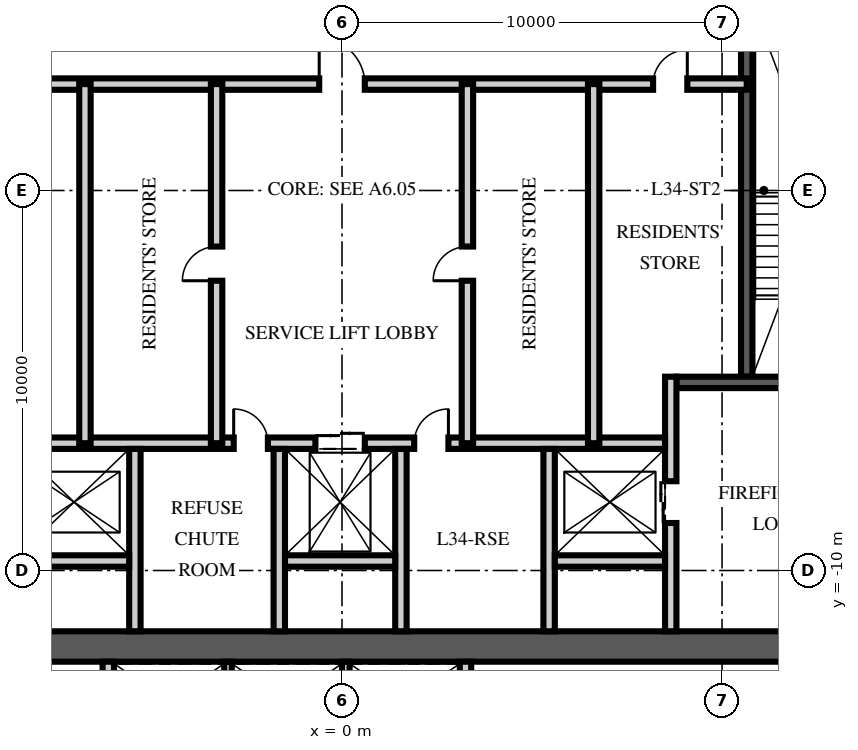
"""IFC4 building model, lengths in metres.
Left out: names, types, materials, properties, quantities, classifications, styles, units other than length and angle.
Written with IfcOpenShell. Run it as: python <this file> out.ifc"""

import sys

from ifc_helpers import new_model, si_unit, direction, frame, frame_2d, origin, place, context, subcontext, project, spatial, rectangle, extrude, element, fill, save


model = new_model("IFC4")
c1 = context("Model", 3, precision=1e-05, world=origin(), true_north=direction((0.0, 1.0)))
c2 = subcontext(c1, "Body", "Model", "MODEL_VIEW")
j1 = project(units=[si_unit("LENGTHUNIT", "METRE"), si_unit("PLANEANGLEUNIT", "RADIAN")], contexts=[c1])
p1 = place(None, origin())
s1 = spatial("IfcSite", under=j1, at=p1, CompositionType="ELEMENT")
p2 = place(p1, origin())
s2 = spatial("IfcBuilding", under=s1, at=p2, CompositionType="ELEMENT")
p3 = place(p2, frame((0.0, 0.0, 137.25)))
s3 = spatial("IfcBuildingStorey", under=s2, at=p3, CompositionType="ELEMENT", Elevation=137.25)
p4 = place(p3, frame((-15.5, -12.0, -0.25), z_axis=(0.0, 0.0, 1.0), x_axis=(1.0, 0.0, 0.0)))
e1 = element("IfcWall", 1, at=p4, inside=s3, PredefinedType="SHEAR", context=c2, shape_type="SweptSolid", body=[
    extrude(rectangle(XDim=31.0, YDim=0.8, at=frame_2d((15.5, 0.0))), origin(), (0.0, 0.0, 1.0), 3.75),
])
p5 = place(p3, frame((10.65, -4.9, 0.0), z_axis=(0.0, 0.0, 1.0), x_axis=(0.0, 1.0, 0.0)))
e2 = element("IfcWall", 2, at=p5, inside=s3, PredefinedType="SOLIDWALL", context=c2, shape_type="SweptSolid", body=[
    extrude(rectangle(XDim=10.1, YDim=0.3, at=frame_2d((5.05, 0.0))), origin(), (0.0, 0.0, 1.0), 3.5),
])
p6 = place(p3, frame((14.5, -5.05, 0.0), z_axis=(0.0, 0.0, 1.0), x_axis=(-1.0, 0.0, 0.0)))
e3 = element("IfcWall", 3, at=p6, inside=s3, PredefinedType="SOLIDWALL", context=c2, shape_type="SweptSolid", body=[
    extrude(rectangle(XDim=5.7, YDim=0.3, at=frame_2d((2.85, 0.0))), origin(), (0.0, 0.0, 1.0), 3.5),
])
p7 = place(p6, frame((1.25, 0.0, 0.0)))
e4 = element("IfcOpeningElement", 4, at=p7, cuts=e3, PredefinedType="OPENING", context=c2, shape_type="SweptSolid", body=[
    extrude(rectangle(XDim=1.2, YDim=2.1, at=frame_2d((0.6, 1.05))), frame((0.0, 0.16, 0.0), z_axis=(0.0, -1.0, 0.0), x_axis=(1.0, 0.0, 0.0)), (0.0, 0.0, 1.0), 0.32),
])
p8 = place(p3, frame((8.65, -11.6, 0.0), z_axis=(0.0, 0.0, 1.0), x_axis=(0.0, 1.0, 0.0)))
e5 = element("IfcWall", 5, at=p8, inside=s3, PredefinedType="PARTITIONING", context=c2, shape_type="SweptSolid", body=[
    extrude(rectangle(XDim=6.7, YDim=0.3, at=frame_2d((3.35, 0.0))), origin(), (0.0, 0.0, 1.0), 3.5),
])
p9 = place(p8, frame((2.85, 0.0, 0.0)))
e6 = element("IfcOpeningElement", 6, at=p9, cuts=e5, PredefinedType="OPENING", context=c2, shape_type="SweptSolid", body=[
    extrude(rectangle(XDim=1.1, YDim=2.1, at=frame_2d((0.55, 1.05))), frame((0.0, 0.16, 0.0), z_axis=(0.0, -1.0, 0.0), x_axis=(1.0, 0.0, 0.0)), (0.0, 0.0, 1.0), 0.32),
])
p10 = place(p3, frame((-8.5, -6.65, 0.0), z_axis=(0.0, 0.0, 1.0), x_axis=(1.0, 0.0, 0.0)))
e7 = element("IfcWall", 7, at=p10, inside=s3, PredefinedType="PARTITIONING", context=c2, shape_type="SweptSolid", body=[
    extrude(rectangle(XDim=17.0, YDim=0.3, at=frame_2d((8.5, 0.0))), origin(), (0.0, 0.0, 1.0), 3.5),
])
p11 = place(p10, frame((7.8, 0.0, 0.0)))
e8 = element("IfcOpeningElement", 8, at=p11, cuts=e7, PredefinedType="OPENING", context=c2, shape_type="SweptSolid", body=[
    extrude(rectangle(XDim=1.3, YDim=2.4, at=frame_2d((0.65, 1.2))), frame((0.0, 0.16, 0.0), z_axis=(0.0, -1.0, 0.0), x_axis=(1.0, 0.0, 0.0)), (0.0, 0.0, 1.0), 0.32),
])
p12 = place(p10, frame((5.65, 0.0, 0.0)))
e9 = element("IfcOpeningElement", 9, at=p12, cuts=e7, PredefinedType="OPENING", context=c2, shape_type="SweptSolid", body=[
    extrude(rectangle(XDim=0.9, YDim=2.1, at=frame_2d((0.45, 1.05))), frame((0.0, 0.16, 0.0), z_axis=(0.0, -1.0, 0.0), x_axis=(1.0, 0.0, 0.0)), (0.0, 0.0, 1.0), 0.32),
])
p13 = place(p10, frame((10.4, 0.0, 0.0)))
e10 = element("IfcOpeningElement", 10, at=p13, cuts=e7, PredefinedType="OPENING", context=c2, shape_type="SweptSolid", body=[
    extrude(rectangle(XDim=0.9, YDim=2.1, at=frame_2d((0.45, 1.05))), frame((0.0, 0.16, 0.0), z_axis=(0.0, -1.0, 0.0), x_axis=(1.0, 0.0, 0.0)), (0.0, 0.0, 1.0), 0.32),
])
for number, where, z_axis, x_axis in (
    (11, (-5.45, -11.6, 0.0), (0.0, 0.0, 1.0), (0.0, 1.0, 0.0)),
    (12, (-1.65, -11.6, 0.0), (0.0, 0.0, 1.0), (0.0, 1.0, 0.0)),
    (13, (1.55, -11.6, 0.0), (0.0, 0.0, 1.0), (0.0, 1.0, 0.0)),
    (14, (5.45, -11.6, 0.0), (0.0, 0.0, 1.0), (0.0, 1.0, 0.0)),
):
    element("IfcWall", number, at=place(p3, frame(where, z_axis=z_axis, x_axis=x_axis)), inside=s3, PredefinedType="PARTITIONING", context=c2, shape_type="SweptSolid", body=[
        extrude(rectangle(XDim=4.8, YDim=0.3, at=frame_2d((2.4, 0.0))), origin(), (0.0, 0.0, 1.0), 3.5),
    ])
for number, where, z_axis, x_axis in (
    (15, (-8.5, -9.75, 0.0), (0.0, 0.0, 1.0), (1.0, 0.0, 0.0)),
    (16, (-1.5, -9.75, 0.0), (0.0, 0.0, 1.0), (1.0, 0.0, 0.0)),
    (17, (5.6, -9.75, 0.0), (0.0, 0.0, 1.0), (1.0, 0.0, 0.0)),
):
    element("IfcWall", number, at=place(p3, frame(where, z_axis=z_axis, x_axis=x_axis)), inside=s3, PredefinedType="PARTITIONING", context=c2, shape_type="SweptSolid", body=[
        extrude(rectangle(XDim=2.9, YDim=0.3, at=frame_2d((1.45, 0.0))), origin(), (0.0, 0.0, 1.0), 3.5),
    ])
for number, where, z_axis, x_axis in (
    (18, (-6.15, -14.5, 0.0), (0.0, 0.0, 1.0), (0.0, 1.0, 0.0)),
    (19, (3.25, -14.5, 0.0), (0.0, 0.0, 1.0), (0.0, 1.0, 0.0)),
):
    element("IfcWall", number, at=place(p3, frame(where, z_axis=z_axis, x_axis=x_axis)), inside=s3, PredefinedType="PARTITIONING", context=c2, shape_type="SweptSolid", body=[
        extrude(rectangle(XDim=2.1, YDim=0.3, at=frame_2d((1.05, 0.0))), origin(), (0.0, 0.0, 1.0), 3.5),
    ])
for number, where, z_axis, x_axis in (
    (20, (-3.0, -14.5, 0.0), (0.0, 0.0, 1.0), (0.0, 1.0, 0.0)),
    (21, (0.1, -14.5, 0.0), (0.0, 0.0, 1.0), (0.0, 1.0, 0.0)),
):
    element("IfcWall", number, at=place(p3, frame(where, z_axis=z_axis, x_axis=x_axis)), inside=s3, PredefinedType="PARTITIONING", context=c2, shape_type="SweptSolid", body=[
        extrude(rectangle(XDim=2.1, YDim=0.2, at=frame_2d((1.05, 0.0))), origin(), (0.0, 0.0, 1.0), 3.5),
    ])
p14 = place(p3, frame((-10.65, 2.8, 0.0), z_axis=(0.0, 0.0, 1.0), x_axis=(1.0, 0.0, 0.0)))
e22 = element("IfcWall", 22, at=p14, inside=s3, PredefinedType="PARTITIONING", context=c2, shape_type="SweptSolid", body=[
    extrude(rectangle(XDim=21.3, YDim=0.3, at=frame_2d((10.65, 0.0))), origin(), (0.0, 0.0, 1.0), 3.5),
])
p15 = place(p14, frame((10.05, 0.0, 0.0)))
e23 = element("IfcOpeningElement", 23, at=p15, cuts=e22, PredefinedType="OPENING", context=c2, shape_type="SweptSolid", body=[
    extrude(rectangle(XDim=1.2, YDim=2.1, at=frame_2d((0.6, 1.05))), frame((0.0, 0.16, 0.0), z_axis=(0.0, -1.0, 0.0), x_axis=(1.0, 0.0, 0.0)), (0.0, 0.0, 1.0), 0.32),
])
p16 = place(p14, frame((1.493, 0.0, 0.0)))
e24 = element("IfcOpeningElement", 24, at=p16, cuts=e22, PredefinedType="OPENING", context=c2, shape_type="SweptSolid", body=[
    extrude(rectangle(XDim=0.9, YDim=2.1, at=frame_2d((0.45, 1.05))), frame((0.0, 0.16, 0.0), z_axis=(0.0, -1.0, 0.0), x_axis=(1.0, 0.0, 0.0)), (0.0, 0.0, 1.0), 0.32),
])
p17 = place(p14, frame((18.836, 0.0, 0.0)))
e25 = element("IfcOpeningElement", 25, at=p17, cuts=e22, PredefinedType="OPENING", context=c2, shape_type="SweptSolid", body=[
    extrude(rectangle(XDim=0.9, YDim=2.1, at=frame_2d((0.45, 1.05))), frame((0.0, 0.16, 0.0), z_axis=(0.0, -1.0, 0.0), x_axis=(1.0, 0.0, 0.0)), (0.0, 0.0, 1.0), 0.32),
])
p18 = place(p3, frame((-3.3, -6.65, 0.0), z_axis=(0.0, 0.0, 1.0), x_axis=(0.0, 1.0, 0.0)))
e26 = element("IfcWall", 26, at=p18, inside=s3, PredefinedType="PARTITIONING", context=c2, shape_type="SweptSolid", body=[
    extrude(rectangle(XDim=9.45, YDim=0.3, at=frame_2d((4.725, 0.0))), origin(), (0.0, 0.0, 1.0), 3.5),
])
p19 = place(p18, frame((4.275, 0.0, 0.0)))
e27 = element("IfcOpeningElement", 27, at=p19, cuts=e26, PredefinedType="OPENING", context=c2, shape_type="SweptSolid", body=[
    extrude(rectangle(XDim=0.9, YDim=2.1, at=frame_2d((0.45, 1.05))), frame((0.0, 0.16, 0.0), z_axis=(0.0, -1.0, 0.0), x_axis=(1.0, 0.0, 0.0)), (0.0, 0.0, 1.0), 0.32),
])
p20 = place(p3, frame((3.3, -6.65, 0.0), z_axis=(0.0, 0.0, 1.0), x_axis=(0.0, 1.0, 0.0)))
e28 = element("IfcWall", 28, at=p20, inside=s3, PredefinedType="PARTITIONING", context=c2, shape_type="SweptSolid", body=[
    extrude(rectangle(XDim=9.45, YDim=0.3, at=frame_2d((4.725, 0.0))), origin(), (0.0, 0.0, 1.0), 3.5),
])
p21 = place(p20, frame((4.275, 0.0, 0.0)))
e29 = element("IfcOpeningElement", 29, at=p21, cuts=e28, PredefinedType="OPENING", context=c2, shape_type="SweptSolid", body=[
    extrude(rectangle(XDim=0.9, YDim=2.1, at=frame_2d((0.45, 1.05))), frame((0.0, 0.16, 0.0), z_axis=(0.0, -1.0, 0.0), x_axis=(1.0, 0.0, 0.0)), (0.0, 0.0, 1.0), 0.32),
])
for number, where, z_axis, x_axis in (
    (30, (-6.764, -6.65, 0.0), (0.0, 0.0, 1.0), (0.0, 1.0, 0.0)),
    (31, (6.622, -6.65, 0.0), (0.0, 0.0, 1.0), (0.0, 1.0, 0.0)),
):
    element("IfcWall", number, at=place(p3, frame(where, z_axis=z_axis, x_axis=x_axis)), inside=s3, PredefinedType="PARTITIONING", context=c2, shape_type="SweptSolid", body=[
        extrude(rectangle(XDim=9.45, YDim=0.3, at=frame_2d((4.725, 0.0))), origin(), (0.0, 0.0, 1.0), 3.5),
    ])
p22 = place(p9, origin())
e32 = element("IfcDoor", 32, at=p22, inside=s3, OperationType="DOUBLE_DOOR_SLIDING", PredefinedType="DOOR", context=c2, shape_type="SweptSolid", body=[
    extrude(rectangle(XDim=1.1, YDim=2.1, at=frame_2d((0.55, 1.05))), frame((0.0, 0.025, 0.0), z_axis=(0.0, -1.0, 0.0), x_axis=(1.0, 0.0, 0.0)), (0.0, 0.0, 1.0), 0.05),
])
fill(e6, e32)
p23 = place(p11, origin())
e33 = element("IfcDoor", 33, at=p23, inside=s3, OperationType="DOUBLE_DOOR_SLIDING", PredefinedType="DOOR", context=c2, shape_type="SweptSolid", body=[
    extrude(rectangle(XDim=1.3, YDim=2.4, at=frame_2d((0.65, 1.2))), frame((0.0, 0.025, 0.0), z_axis=(0.0, -1.0, 0.0), x_axis=(1.0, 0.0, 0.0)), (0.0, 0.0, 1.0), 0.05),
])
fill(e8, e33)
p24 = place(p15, origin())
e34 = element("IfcDoor", 34, at=p24, inside=s3, OperationType="SINGLE_SWING_LEFT", PredefinedType="DOOR", context=c2, shape_type="SweptSolid", body=[
    extrude(rectangle(XDim=1.2, YDim=2.1, at=frame_2d((0.6, 1.05))), frame((0.0, 0.025, 0.0), z_axis=(0.0, -1.0, 0.0), x_axis=(1.0, 0.0, 0.0)), (0.0, 0.0, 1.0), 0.05),
])
fill(e23, e34)
p25 = place(p12, origin())
e35 = element("IfcDoor", 35, at=p25, inside=s3, OperationType="SINGLE_SWING_LEFT", PredefinedType="DOOR", context=c2, shape_type="SweptSolid", body=[
    extrude(rectangle(XDim=0.9, YDim=2.1, at=frame_2d((0.45, 1.05))), frame((0.0, 0.025, 0.0), z_axis=(0.0, -1.0, 0.0), x_axis=(1.0, 0.0, 0.0)), (0.0, 0.0, 1.0), 0.05),
])
fill(e9, e35)
p26 = place(p13, origin())
e36 = element("IfcDoor", 36, at=p26, inside=s3, OperationType="SINGLE_SWING_RIGHT", PredefinedType="DOOR", context=c2, shape_type="SweptSolid", body=[
    extrude(rectangle(XDim=0.9, YDim=2.1, at=frame_2d((0.45, 1.05))), frame((0.0, 0.025, 0.0), z_axis=(0.0, -1.0, 0.0), x_axis=(1.0, 0.0, 0.0)), (0.0, 0.0, 1.0), 0.05),
])
fill(e10, e36)
p27 = place(p19, origin())
e37 = element("IfcDoor", 37, at=p27, inside=s3, OperationType="SINGLE_SWING_LEFT", PredefinedType="DOOR", context=c2, shape_type="SweptSolid", body=[
    extrude(rectangle(XDim=0.9, YDim=2.1, at=frame_2d((0.45, 1.05))), frame((0.0, 0.025, 0.0), z_axis=(0.0, -1.0, 0.0), x_axis=(1.0, 0.0, 0.0)), (0.0, 0.0, 1.0), 0.05),
])
fill(e27, e37)
p28 = place(p21, origin())
e38 = element("IfcDoor", 38, at=p28, inside=s3, OperationType="SINGLE_SWING_LEFT", PredefinedType="DOOR", context=c2, shape_type="SweptSolid", body=[
    extrude(rectangle(XDim=0.9, YDim=2.1, at=frame_2d((0.45, 1.05))), frame((0.0, 0.025, 0.0), z_axis=(0.0, -1.0, 0.0), x_axis=(1.0, 0.0, 0.0)), (0.0, 0.0, 1.0), 0.05),
])
fill(e29, e38)
p29 = place(p17, origin())
e39 = element("IfcDoor", 39, at=p29, inside=s3, OperationType="SINGLE_SWING_RIGHT", PredefinedType="DOOR", context=c2, shape_type="SweptSolid", body=[
    extrude(rectangle(XDim=0.9, YDim=2.1, at=frame_2d((0.45, 1.05))), frame((0.0, 0.025, 0.0), z_axis=(0.0, -1.0, 0.0), x_axis=(1.0, 0.0, 0.0)), (0.0, 0.0, 1.0), 0.05),
])
fill(e25, e39)
save(model, sys.argv[1])
